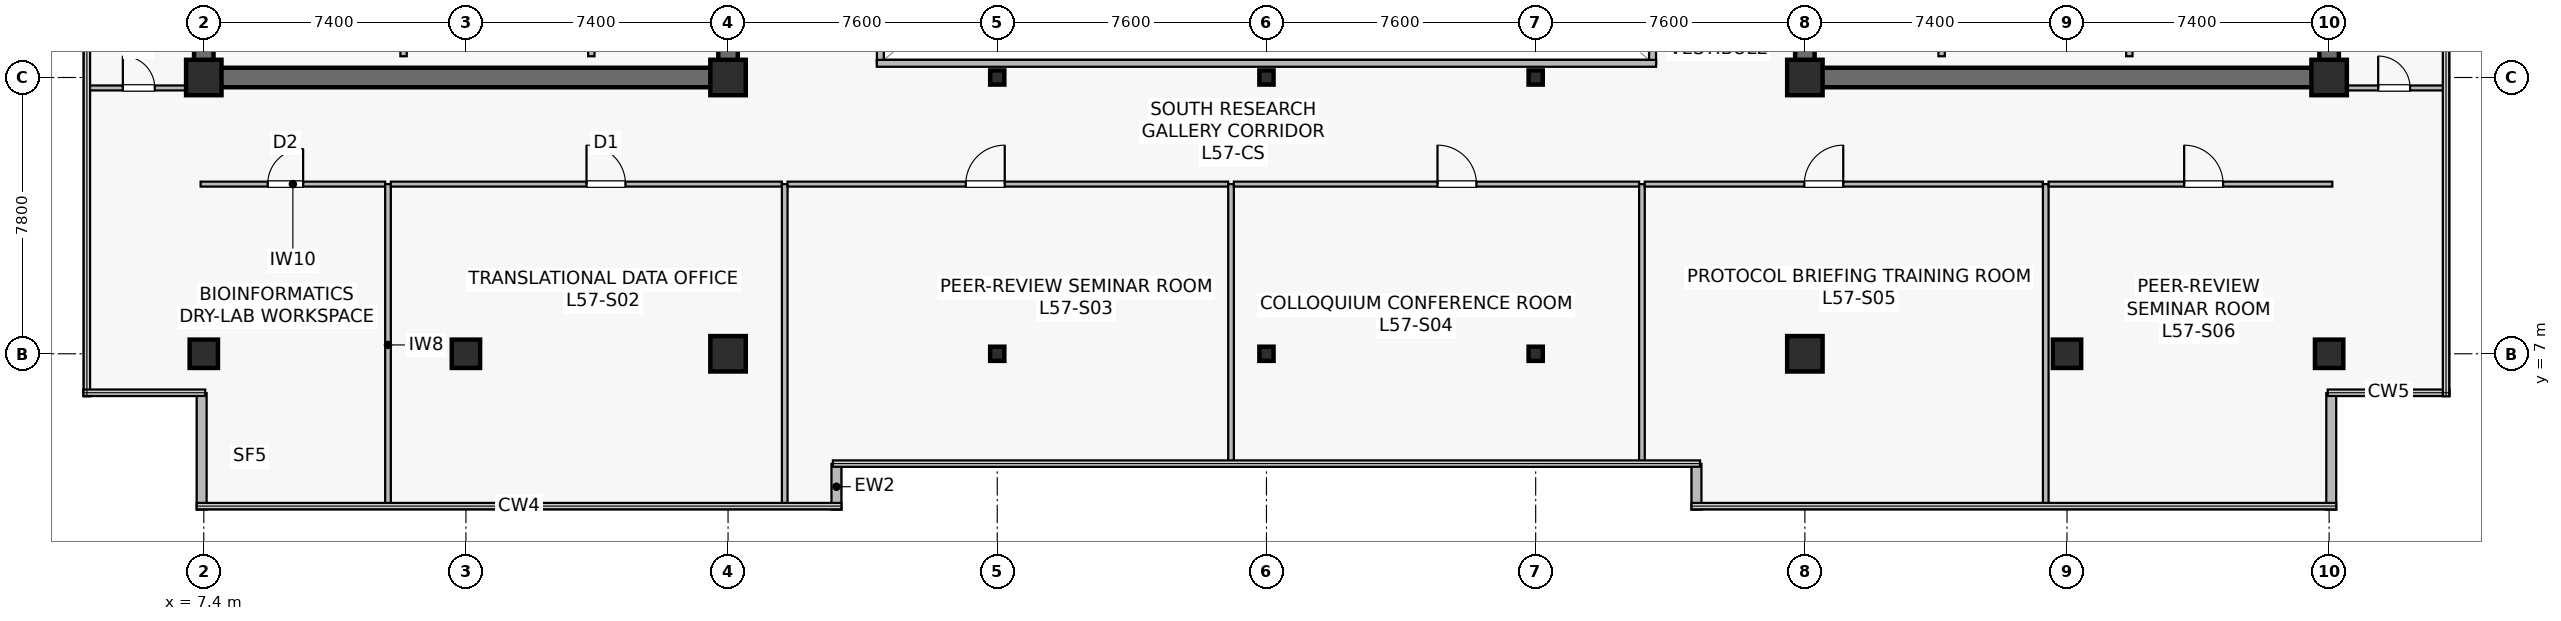
"""IFC4 building model, lengths in metres.
Left out: names, types, materials, properties, quantities, classifications, styles, units other than length and angle.
Written with IfcOpenShell. Run it as: python <this file> out.ifc"""

import sys

from ifc_helpers import new_model, si_unit, direction, frame, frame_2d, origin, origin_2d, place, context, subcontext, project, spatial, rectangle, hollow_rectangle, extrude, source, transform, mapped, element, fill, save


model = new_model("IFC4")
c1 = context("Model", 3, precision=1e-05, world=origin(), true_north=direction((0.0, 1.0)))
c2 = subcontext(c1, "Body", "Model", "MODEL_VIEW")
j1 = project(units=[si_unit("LENGTHUNIT", "METRE"), si_unit("PLANEANGLEUNIT", "RADIAN")], contexts=[c1])
p1 = place(None, origin())
s1 = spatial("IfcSite", under=j1, at=p1, CompositionType="ELEMENT")
p2 = place(p1, origin())
s2 = spatial("IfcBuilding", under=s1, at=p2, CompositionType="ELEMENT")
p3 = place(p2, frame((0.0, 0.0, 238.3)))
s3 = spatial("IfcBuildingStorey", under=s2, at=p3, CompositionType="ELEMENT", Elevation=238.3)
p4 = place(p3, frame((7.125, 14.8, 0.0), z_axis=(0.0, 0.0, 1.0), x_axis=(1.0, 0.0, 0.0)))
e1 = element("IfcWall", 1, at=p4, inside=s3, PredefinedType="SHEAR", context=c2, shape_type="SweptSolid", body=[
    extrude(rectangle(XDim=15.35, YDim=0.55, at=frame_2d((7.675, 0.0))), origin(), (0.0, 0.0, 1.0), 3.8),
])
p5 = place(p3, frame((7.4, 15.075, 0.0), z_axis=(0.0, 0.0, 1.0), x_axis=(0.0, 1.0, 0.0)))
e2 = element("IfcWall", 2, at=p5, inside=s3, PredefinedType="SHEAR", context=c2, shape_type="SweptSolid", body=[
    extrude(rectangle(XDim=18.45, YDim=0.55, at=frame_2d((9.225, 0.0))), origin(), (0.0, 0.0, 1.0), 3.8),
])
p6 = place(p3, frame((22.2, 15.075, 0.0), z_axis=(0.0, 0.0, 1.0), x_axis=(0.0, 1.0, 0.0)))
e3 = element("IfcWall", 3, at=p6, inside=s3, PredefinedType="SHEAR", context=c2, shape_type="SweptSolid", body=[
    extrude(rectangle(XDim=18.45, YDim=0.55, at=frame_2d((9.225, 0.0))), origin(), (0.0, 0.0, 1.0), 3.8),
])
p7 = place(p6, frame((3.475, 0.0, 0.0)))
e4 = element("IfcOpeningElement", 4, at=p7, cuts=e3, PredefinedType="OPENING", context=c2, shape_type="SweptSolid", body=[
    extrude(rectangle(XDim=1.42, YDim=2.2, at=frame_2d((0.71, 1.1))), frame((0.0, 0.285, 0.0), z_axis=(0.0, -1.0, 0.0), x_axis=(1.0, 0.0, 0.0)), (0.0, 0.0, 1.0), 0.57),
])
p8 = place(p3, frame((52.325, 14.8, 0.0), z_axis=(0.0, 0.0, 1.0), x_axis=(1.0, 0.0, 0.0)))
e5 = element("IfcWall", 5, at=p8, inside=s3, PredefinedType="SHEAR", context=c2, shape_type="SweptSolid", body=[
    extrude(rectangle(XDim=15.35, YDim=0.55, at=frame_2d((7.675, 0.0))), origin(), (0.0, 0.0, 1.0), 3.8),
])
p9 = place(p3, frame((52.6, 15.075, 0.0), z_axis=(0.0, 0.0, 1.0), x_axis=(0.0, 1.0, 0.0)))
e6 = element("IfcWall", 6, at=p9, inside=s3, PredefinedType="SHEAR", context=c2, shape_type="SweptSolid", body=[
    extrude(rectangle(XDim=18.45, YDim=0.55, at=frame_2d((9.225, 0.0))), origin(), (0.0, 0.0, 1.0), 3.8),
])
p10 = place(p9, frame((3.475, 0.0, 0.0)))
e7 = element("IfcOpeningElement", 7, at=p10, cuts=e6, PredefinedType="OPENING", context=c2, shape_type="SweptSolid", body=[
    extrude(rectangle(XDim=1.42, YDim=2.2, at=frame_2d((0.71, 1.1))), frame((0.0, 0.285, 0.0), z_axis=(0.0, -1.0, 0.0), x_axis=(1.0, 0.0, 0.0)), (0.0, 0.0, 1.0), 0.57),
])
p11 = place(p3, frame((67.4, 15.075, 0.0), z_axis=(0.0, 0.0, 1.0), x_axis=(0.0, 1.0, 0.0)))
e8 = element("IfcWall", 8, at=p11, inside=s3, PredefinedType="SHEAR", context=c2, shape_type="SweptSolid", body=[
    extrude(rectangle(XDim=18.45, YDim=0.55, at=frame_2d((9.225, 0.0))), origin(), (0.0, 0.0, 1.0), 3.8),
])
m1 = source(origin(), c2, "Body", "SweptSolid", [
    extrude(rectangle(XDim=0.8, YDim=0.8, at=origin_2d()), origin(), (0.0, 0.0, 1.0), 4.1),
])
p12 = place(p3, frame((14.8, 7.0, 0.0), z_axis=(0.0, 0.0, 1.0), x_axis=(1.0, 0.0, 0.0)))
e9 = element("IfcColumn", 9, at=p12, inside=s3, PredefinedType="COLUMN", context=c2, shape_type="MappedRepresentation", body=[
    mapped(m1, transform((0.0, 0.0, 0.0), scale=1.0)),
])
m2 = source(origin(), c2, "Body", "SweptSolid", [
    extrude(rectangle(XDim=1.0, YDim=1.0, at=origin_2d()), origin(), (0.0, 0.0, 1.0), 4.1),
])
for number, where, z_axis, x_axis in (
    (10, (22.2, 7.0, 0.0), (0.0, 0.0, 1.0), (1.0, 0.0, 0.0)),
    (11, (7.4, 14.8, 0.0), (0.0, 0.0, 1.0), (1.0, 0.0, 0.0)),
    (12, (22.2, 14.8, 0.0), (0.0, 0.0, 1.0), (1.0, 0.0, 0.0)),
    (13, (52.6, 7.0, 0.0), (0.0, 0.0, 1.0), (1.0, 0.0, 0.0)),
):
    element("IfcColumn", number, at=place(p3, frame(where, z_axis=z_axis, x_axis=x_axis)), inside=s3, PredefinedType="COLUMN", context=c2, shape_type="MappedRepresentation", body=[
        mapped(m2, transform((0.0, 0.0, 0.0), scale=1.0)),
    ])
p13 = place(p3, frame((60.0, 7.0, 0.0), z_axis=(0.0, 0.0, 1.0), x_axis=(1.0, 0.0, 0.0)))
e14 = element("IfcColumn", 14, at=p13, inside=s3, PredefinedType="COLUMN", context=c2, shape_type="MappedRepresentation", body=[
    mapped(m1, transform((0.0, 0.0, 0.0), scale=1.0)),
])
for number, where, z_axis, x_axis in (
    (15, (52.6, 14.8, 0.0), (0.0, 0.0, 1.0), (1.0, 0.0, 0.0)),
    (16, (67.4, 14.8, 0.0), (0.0, 0.0, 1.0), (1.0, 0.0, 0.0)),
):
    element("IfcColumn", number, at=place(p3, frame(where, z_axis=z_axis, x_axis=x_axis)), inside=s3, PredefinedType="COLUMN", context=c2, shape_type="MappedRepresentation", body=[
        mapped(m2, transform((0.0, 0.0, 0.0), scale=1.0)),
    ])
for number, where, z_axis, x_axis in (
    (17, (7.4, 7.0, 0.0), (0.0, 0.0, 1.0), (1.0, 0.0, 0.0)),
    (18, (67.4, 7.0, 0.0), (0.0, 0.0, 1.0), (1.0, 0.0, 0.0)),
):
    element("IfcColumn", number, at=place(p3, frame(where, z_axis=z_axis, x_axis=x_axis)), inside=s3, PredefinedType="COLUMN", context=c2, shape_type="MappedRepresentation", body=[
        mapped(m1, transform((0.0, 0.0, 0.0), scale=1.0)),
    ])
m3 = source(origin(), c2, "Body", "SweptSolid", [
    extrude(hollow_rectangle(XDim=0.4, YDim=0.4, WallThickness=0.019, at=origin_2d()), origin(), (0.0, 0.0, 1.0), 4.1),
])
for number, where, z_axis, x_axis in (
    (19, (29.8, 7.0, 0.0), (0.0, 0.0, 1.0), (1.0, 0.0, 0.0)),
    (20, (29.8, 14.8, 0.0), (0.0, 0.0, 1.0), (1.0, 0.0, 0.0)),
    (21, (37.4, 7.0, 0.0), (0.0, 0.0, 1.0), (1.0, 0.0, 0.0)),
    (22, (37.4, 14.8, 0.0), (0.0, 0.0, 1.0), (1.0, 0.0, 0.0)),
    (23, (45.0, 7.0, 0.0), (0.0, 0.0, 1.0), (1.0, 0.0, 0.0)),
    (24, (45.0, 14.8, 0.0), (0.0, 0.0, 1.0), (1.0, 0.0, 0.0)),
):
    element("IfcColumn", number, at=place(p3, frame(where, z_axis=z_axis, x_axis=x_axis)), inside=s3, PredefinedType="COLUMN", context=c2, shape_type="MappedRepresentation", body=[
        mapped(m3, transform((0.0, 0.0, 0.0), scale=1.0)),
    ])
for number, where, z_axis, x_axis in (
    (25, (25.26, 2.6, 0.0), (0.0, 0.0, 1.0), (0.0, 1.0, 0.0)),
    (26, (49.54, 3.893, 0.0), (0.0, 0.0, 1.0), (0.0, -1.0, 0.0)),
):
    element("IfcWall", number, at=place(p3, frame(where, z_axis=z_axis, x_axis=x_axis)), inside=s3, PredefinedType="STANDARD", context=c2, shape_type="SweptSolid", body=[
        extrude(rectangle(XDim=1.293, YDim=0.28, at=frame_2d((0.646, 0.0))), origin(), (0.0, 0.0, 1.0), 3.8),
    ])
for number, where, z_axis, x_axis in (
    (27, (67.46, 2.6, 0.0), (0.0, 0.0, 1.0), (0.0, 1.0, 0.0)),
    (28, (7.34, 5.888, 0.0), (0.0, 0.0, 1.0), (0.0, -1.0, 0.0)),
):
    element("IfcWall", number, at=place(p3, frame(where, z_axis=z_axis, x_axis=x_axis)), inside=s3, PredefinedType="STANDARD", context=c2, shape_type="SweptSolid", body=[
        extrude(rectangle(XDim=3.288, YDim=0.28, at=frame_2d((1.644, 0.0))), origin(), (0.0, 0.0, 1.0), 3.8),
    ])
for number, where, z_axis, x_axis in (
    (29, (13.04, 15.4, 0.0), (0.0, 0.0, 1.0), (0.0, 1.0, 0.0)),
    (30, (18.34, 15.4, 0.0), (0.0, 0.0, 1.0), (0.0, 1.0, 0.0)),
    (31, (61.76, 15.4, 0.0), (0.0, 0.0, 1.0), (0.0, 1.0, 0.0)),
    (32, (56.46, 15.4, 0.0), (0.0, 0.0, 1.0), (0.0, 1.0, 0.0)),
):
    element("IfcWall", number, at=place(p3, frame(where, z_axis=z_axis, x_axis=x_axis)), inside=s3, PredefinedType="SOLIDWALL", context=c2, shape_type="SweptSolid", body=[
        extrude(rectangle(XDim=2.4, YDim=0.18, at=frame_2d((1.2, 0.0))), origin(), (0.0, 0.0, 1.0), 3.8),
    ])
p14 = place(p3, frame((26.5, 15.2, 0.0), z_axis=(0.0, 0.0, 1.0), x_axis=(0.0, 1.0, 0.0)))
e33 = element("IfcWall", 33, at=p14, inside=s3, PredefinedType="SOLIDWALL", context=c2, shape_type="SweptSolid", body=[
    extrude(rectangle(XDim=18.2, YDim=0.195, at=frame_2d((9.1, 0.0))), origin(), (0.0, 0.0, 1.0), 3.8),
])
p15 = place(p14, frame((1.8, 0.0, 0.9)))
e34 = element("IfcOpeningElement", 34, at=p15, cuts=e33, PredefinedType="OPENING", context=c2, shape_type="SweptSolid", body=[
    extrude(rectangle(XDim=1.2, YDim=1.35, at=frame_2d((0.6, 0.675))), frame((0.0, 0.107, 0.0), z_axis=(0.0, -1.0, 0.0), x_axis=(1.0, 0.0, 0.0)), (0.0, 0.0, 1.0), 0.215),
])
p16 = place(p14, frame((13.2, 0.0, 0.9)))
e35 = element("IfcOpeningElement", 35, at=p16, cuts=e33, PredefinedType="OPENING", context=c2, shape_type="SweptSolid", body=[
    extrude(rectangle(XDim=1.2, YDim=1.35, at=frame_2d((0.6, 0.675))), frame((0.0, 0.107, 0.0), z_axis=(0.0, -1.0, 0.0), x_axis=(1.0, 0.0, 0.0)), (0.0, 0.0, 1.0), 0.215),
])
p17 = place(p3, frame((48.3, 15.2, 0.0), z_axis=(0.0, 0.0, 1.0), x_axis=(0.0, 1.0, 0.0)))
e36 = element("IfcWall", 36, at=p17, inside=s3, PredefinedType="SOLIDWALL", context=c2, shape_type="SweptSolid", body=[
    extrude(rectangle(XDim=18.2, YDim=0.195, at=frame_2d((9.1, 0.0))), origin(), (0.0, 0.0, 1.0), 3.8),
])
p18 = place(p17, frame((1.8, 0.0, 0.9)))
e37 = element("IfcOpeningElement", 37, at=p18, cuts=e36, PredefinedType="OPENING", context=c2, shape_type="SweptSolid", body=[
    extrude(rectangle(XDim=1.2, YDim=1.35, at=frame_2d((0.6, 0.675))), frame((0.0, 0.107, 0.0), z_axis=(0.0, -1.0, 0.0), x_axis=(1.0, 0.0, 0.0)), (0.0, 0.0, 1.0), 0.215),
])
p19 = place(p17, frame((13.2, 0.0, 0.9)))
e38 = element("IfcOpeningElement", 38, at=p19, cuts=e36, PredefinedType="OPENING", context=c2, shape_type="SweptSolid", body=[
    extrude(rectangle(XDim=1.2, YDim=1.35, at=frame_2d((0.6, 0.675))), frame((0.0, 0.107, 0.0), z_axis=(0.0, -1.0, 0.0), x_axis=(1.0, 0.0, 0.0)), (0.0, 0.0, 1.0), 0.215),
])
p20 = place(p3, frame((26.4, 15.2, 0.0), z_axis=(0.0, 0.0, 1.0), x_axis=(1.0, 0.0, 0.0)))
e39 = element("IfcWall", 39, at=p20, inside=s3, PredefinedType="SOLIDWALL", context=c2, shape_type="SweptSolid", body=[
    extrude(rectangle(XDim=22.0, YDim=0.195, at=frame_2d((11.0, 0.0))), origin(), (0.0, 0.0, 1.0), 3.8),
])
p21 = place(p3, frame((7.31, 11.79, 0.0), z_axis=(0.0, 0.0, 1.0), x_axis=(1.0, 0.0, 0.0)))
e40 = element("IfcWall", 40, at=p21, inside=s3, PredefinedType="PARTITIONING", context=c2, shape_type="SweptSolid", body=[
    extrude(rectangle(XDim=5.21, YDim=0.14, at=frame_2d((2.605, 0.0))), origin(), (0.0, 0.0, 1.0), 3.335),
])
p22 = place(p21, frame((1.894, 0.0, 0.0)))
e41 = element("IfcOpeningElement", 41, at=p22, cuts=e40, PredefinedType="OPENING", context=c2, shape_type="SweptSolid", body=[
    extrude(rectangle(XDim=1.0, YDim=2.15, at=frame_2d((0.5, 1.075))), frame((0.0, 0.08, 0.0), z_axis=(0.0, -1.0, 0.0), x_axis=(1.0, 0.0, 0.0)), (0.0, 0.0, 1.0), 0.16),
])
p23 = place(p3, frame((12.6, 2.71, 0.0), z_axis=(0.0, 0.0, 1.0), x_axis=(0.0, 1.0, 0.0)))
e42 = element("IfcWall", 42, at=p23, inside=s3, PredefinedType="PARTITIONING", context=c2, shape_type="SweptSolid", body=[
    extrude(rectangle(XDim=9.08, YDim=0.16, at=frame_2d((4.54, 0.0))), origin(), (0.0, 0.0, 1.0), 3.135),
])
p24 = place(p3, frame((12.68, 11.79, 0.0), z_axis=(0.0, 0.0, 1.0), x_axis=(1.0, 0.0, 0.0)))
e43 = element("IfcWall", 43, at=p24, inside=s3, PredefinedType="PARTITIONING", context=c2, shape_type="SweptSolid", body=[
    extrude(rectangle(XDim=11.04, YDim=0.14, at=frame_2d((5.52, 0.0))), origin(), (0.0, 0.0, 1.0), 3.197),
])
p25 = place(p24, frame((5.524, 0.0, 0.0)))
e44 = element("IfcOpeningElement", 44, at=p25, cuts=e43, PredefinedType="OPENING", context=c2, shape_type="SweptSolid", body=[
    extrude(rectangle(XDim=1.1, YDim=2.18, at=frame_2d((0.55, 1.09))), frame((0.0, 0.08, 0.0), z_axis=(0.0, -1.0, 0.0), x_axis=(1.0, 0.0, 0.0)), (0.0, 0.0, 1.0), 0.16),
])
p26 = place(p3, frame((23.8, 2.71, 0.0), z_axis=(0.0, 0.0, 1.0), x_axis=(0.0, 1.0, 0.0)))
e45 = element("IfcWall", 45, at=p26, inside=s3, PredefinedType="PARTITIONING", context=c2, shape_type="SweptSolid", body=[
    extrude(rectangle(XDim=9.08, YDim=0.16, at=frame_2d((4.54, 0.0))), origin(), (0.0, 0.0, 1.0), 3.135),
])
p27 = place(p3, frame((23.88, 11.79, 0.0), z_axis=(0.0, 0.0, 1.0), x_axis=(1.0, 0.0, 0.0)))
e46 = element("IfcWall", 46, at=p27, inside=s3, PredefinedType="PARTITIONING", context=c2, shape_type="SweptSolid", body=[
    extrude(rectangle(XDim=12.44, YDim=0.14, at=frame_2d((6.22, 0.0))), origin(), (0.0, 0.0, 1.0), 3.197),
])
p28 = place(p27, frame((5.031, 0.0, 0.0)))
e47 = element("IfcOpeningElement", 47, at=p28, cuts=e46, PredefinedType="OPENING", context=c2, shape_type="SweptSolid", body=[
    extrude(rectangle(XDim=1.1, YDim=2.18, at=frame_2d((0.55, 1.09))), frame((0.0, 0.08, 0.0), z_axis=(0.0, -1.0, 0.0), x_axis=(1.0, 0.0, 0.0)), (0.0, 0.0, 1.0), 0.16),
])
p29 = place(p3, frame((36.4, 3.91, 0.0), z_axis=(0.0, 0.0, 1.0), x_axis=(0.0, 1.0, 0.0)))
e48 = element("IfcWall", 48, at=p29, inside=s3, PredefinedType="PARTITIONING", context=c2, shape_type="SweptSolid", body=[
    extrude(rectangle(XDim=7.88, YDim=0.16, at=frame_2d((3.94, 0.0))), origin(), (0.0, 0.0, 1.0), 3.135),
])
p30 = place(p3, frame((36.48, 11.79, 0.0), z_axis=(0.0, 0.0, 1.0), x_axis=(1.0, 0.0, 0.0)))
e49 = element("IfcWall", 49, at=p30, inside=s3, PredefinedType="PARTITIONING", context=c2, shape_type="SweptSolid", body=[
    extrude(rectangle(XDim=11.44, YDim=0.14, at=frame_2d((5.72, 0.0))), origin(), (0.0, 0.0, 1.0), 3.197),
])
p31 = place(p30, frame((5.748, 0.0, 0.0)))
e50 = element("IfcOpeningElement", 50, at=p31, cuts=e49, PredefinedType="OPENING", context=c2, shape_type="SweptSolid", body=[
    extrude(rectangle(XDim=1.1, YDim=2.18, at=frame_2d((0.55, 1.09))), frame((0.0, 0.08, 0.0), z_axis=(0.0, -1.0, 0.0), x_axis=(1.0, 0.0, 0.0)), (0.0, 0.0, 1.0), 0.16),
])
p32 = place(p3, frame((48.0, 3.91, 0.0), z_axis=(0.0, 0.0, 1.0), x_axis=(0.0, 1.0, 0.0)))
e51 = element("IfcWall", 51, at=p32, inside=s3, PredefinedType="PARTITIONING", context=c2, shape_type="SweptSolid", body=[
    extrude(rectangle(XDim=7.88, YDim=0.16, at=frame_2d((3.94, 0.0))), origin(), (0.0, 0.0, 1.0), 3.135),
])
p33 = place(p3, frame((48.08, 11.79, 0.0), z_axis=(0.0, 0.0, 1.0), x_axis=(1.0, 0.0, 0.0)))
e52 = element("IfcWall", 52, at=p33, inside=s3, PredefinedType="PARTITIONING", context=c2, shape_type="SweptSolid", body=[
    extrude(rectangle(XDim=11.24, YDim=0.14, at=frame_2d((5.62, 0.0))), origin(), (0.0, 0.0, 1.0), 3.197),
])
p34 = place(p33, frame((4.504, 0.0, 0.0)))
e53 = element("IfcOpeningElement", 53, at=p34, cuts=e52, PredefinedType="OPENING", context=c2, shape_type="SweptSolid", body=[
    extrude(rectangle(XDim=1.1, YDim=2.18, at=frame_2d((0.55, 1.09))), frame((0.0, 0.08, 0.0), z_axis=(0.0, -1.0, 0.0), x_axis=(1.0, 0.0, 0.0)), (0.0, 0.0, 1.0), 0.16),
])
p35 = place(p3, frame((59.4, 2.71, 0.0), z_axis=(0.0, 0.0, 1.0), x_axis=(0.0, 1.0, 0.0)))
e54 = element("IfcWall", 54, at=p35, inside=s3, PredefinedType="PARTITIONING", context=c2, shape_type="SweptSolid", body=[
    extrude(rectangle(XDim=9.08, YDim=0.16, at=frame_2d((4.54, 0.0))), origin(), (0.0, 0.0, 1.0), 3.135),
])
p36 = place(p3, frame((59.48, 11.79, 0.0), z_axis=(0.0, 0.0, 1.0), x_axis=(1.0, 0.0, 0.0)))
e55 = element("IfcWall", 55, at=p36, inside=s3, PredefinedType="PARTITIONING", context=c2, shape_type="SweptSolid", body=[
    extrude(rectangle(XDim=8.01, YDim=0.14, at=frame_2d((4.005, 0.0))), origin(), (0.0, 0.0, 1.0), 3.197),
])
p37 = place(p36, frame((3.828, 0.0, 0.0)))
e56 = element("IfcOpeningElement", 56, at=p37, cuts=e55, PredefinedType="OPENING", context=c2, shape_type="SweptSolid", body=[
    extrude(rectangle(XDim=1.1, YDim=2.18, at=frame_2d((0.55, 1.09))), frame((0.0, 0.08, 0.0), z_axis=(0.0, -1.0, 0.0), x_axis=(1.0, 0.0, 0.0)), (0.0, 0.0, 1.0), 0.16),
])
p38 = place(p3, frame((4.11, 14.505, 0.0), z_axis=(0.0, 0.0, 1.0), x_axis=(1.0, 0.0, 0.0)))
e57 = element("IfcWall", 57, at=p38, inside=s3, PredefinedType="PARTITIONING", context=c2, shape_type="SweptSolid", body=[
    extrude(rectangle(XDim=2.91, YDim=0.14, at=frame_2d((1.455, 0.0))), origin(), (0.0, 0.0, 1.0), 3.8),
])
p39 = place(p38, frame((1.005, 0.0, 0.0)))
e58 = element("IfcOpeningElement", 58, at=p39, cuts=e57, PredefinedType="OPENING", context=c2, shape_type="SweptSolid", body=[
    extrude(rectangle(XDim=0.9, YDim=2.1, at=frame_2d((0.45, 1.05))), frame((0.0, 0.08, 0.0), z_axis=(0.0, -1.0, 0.0), x_axis=(1.0, 0.0, 0.0)), (0.0, 0.0, 1.0), 0.16),
])
p40 = place(p3, frame((67.78, 14.505, 0.0), z_axis=(0.0, 0.0, 1.0), x_axis=(1.0, 0.0, 0.0)))
e59 = element("IfcWall", 59, at=p40, inside=s3, PredefinedType="PARTITIONING", context=c2, shape_type="SweptSolid", body=[
    extrude(rectangle(XDim=2.91, YDim=0.14, at=frame_2d((1.455, 0.0))), origin(), (0.0, 0.0, 1.0), 3.8),
])
p41 = place(p40, frame((1.005, 0.0, 0.0)))
e60 = element("IfcOpeningElement", 60, at=p41, cuts=e59, PredefinedType="OPENING", context=c2, shape_type="SweptSolid", body=[
    extrude(rectangle(XDim=0.9, YDim=2.1, at=frame_2d((0.45, 1.05))), frame((0.0, 0.08, 0.0), z_axis=(0.0, -1.0, 0.0), x_axis=(1.0, 0.0, 0.0)), (0.0, 0.0, 1.0), 0.16),
])
m4 = source(origin(), c2, "Body", "SweptSolid", [
    extrude(rectangle(XDim=1.0, YDim=2.15, at=frame_2d((0.5, 1.075))), frame((0.0, 0.025, 0.0), z_axis=(0.0, -1.0, 0.0), x_axis=(1.0, 0.0, 0.0)), (0.0, 0.0, 1.0), 0.05),
])
p42 = place(p22, origin())
e61 = element("IfcDoor", 61, at=p42, inside=s3, OperationType="SINGLE_SWING_RIGHT", PredefinedType="DOOR", context=c2, shape_type="MappedRepresentation", body=[
    mapped(m4, transform((0.0, 0.0, 0.0), scale=1.0)),
])
fill(e41, e61)
m5 = source(origin(), c2, "Body", "SweptSolid", [
    extrude(rectangle(XDim=1.1, YDim=2.18, at=frame_2d((0.55, 1.09))), frame((0.0, 0.025, 0.0), z_axis=(0.0, -1.0, 0.0), x_axis=(1.0, 0.0, 0.0)), (0.0, 0.0, 1.0), 0.05),
])
p43 = place(p25, origin())
e62 = element("IfcDoor", 62, at=p43, inside=s3, OperationType="SINGLE_SWING_LEFT", PredefinedType="DOOR", context=c2, shape_type="MappedRepresentation", body=[
    mapped(m5, transform((0.0, 0.0, 0.0), scale=1.0)),
])
fill(e44, e62)
p44 = place(p28, origin())
e63 = element("IfcDoor", 63, at=p44, inside=s3, OperationType="SINGLE_SWING_RIGHT", PredefinedType="DOOR", context=c2, shape_type="MappedRepresentation", body=[
    mapped(m5, transform((0.0, 0.0, 0.0), scale=1.0)),
])
fill(e47, e63)
p45 = place(p31, origin())
e64 = element("IfcDoor", 64, at=p45, inside=s3, OperationType="SINGLE_SWING_LEFT", PredefinedType="DOOR", context=c2, shape_type="MappedRepresentation", body=[
    mapped(m5, transform((0.0, 0.0, 0.0), scale=1.0)),
])
fill(e50, e64)
p46 = place(p34, origin())
e65 = element("IfcDoor", 65, at=p46, inside=s3, OperationType="SINGLE_SWING_RIGHT", PredefinedType="DOOR", context=c2, shape_type="MappedRepresentation", body=[
    mapped(m5, transform((0.0, 0.0, 0.0), scale=1.0)),
])
fill(e53, e65)
p47 = place(p37, origin())
e66 = element("IfcDoor", 66, at=p47, inside=s3, OperationType="SINGLE_SWING_LEFT", PredefinedType="DOOR", context=c2, shape_type="MappedRepresentation", body=[
    mapped(m5, transform((0.0, 0.0, 0.0), scale=1.0)),
])
fill(e56, e66)
m6 = source(origin(), c2, "Body", "SweptSolid", [
    extrude(rectangle(XDim=0.9, YDim=2.1, at=frame_2d((0.45, 1.05))), frame((0.0, 0.025, 0.0), z_axis=(0.0, -1.0, 0.0), x_axis=(1.0, 0.0, 0.0)), (0.0, 0.0, 1.0), 0.05),
])
p48 = place(p39, origin())
e67 = element("IfcDoor", 67, at=p48, inside=s3, OperationType="SINGLE_SWING_LEFT", PredefinedType="DOOR", context=c2, shape_type="MappedRepresentation", body=[
    mapped(m6, transform((0.0, 0.0, 0.0), scale=1.0)),
])
fill(e58, e67)
p49 = place(p41, origin())
e68 = element("IfcDoor", 68, at=p49, inside=s3, OperationType="SINGLE_SWING_LEFT", PredefinedType="DOOR", context=c2, shape_type="MappedRepresentation", body=[
    mapped(m6, transform((0.0, 0.0, 0.0), scale=1.0)),
])
fill(e60, e68)
save(model, sys.argv[1])
